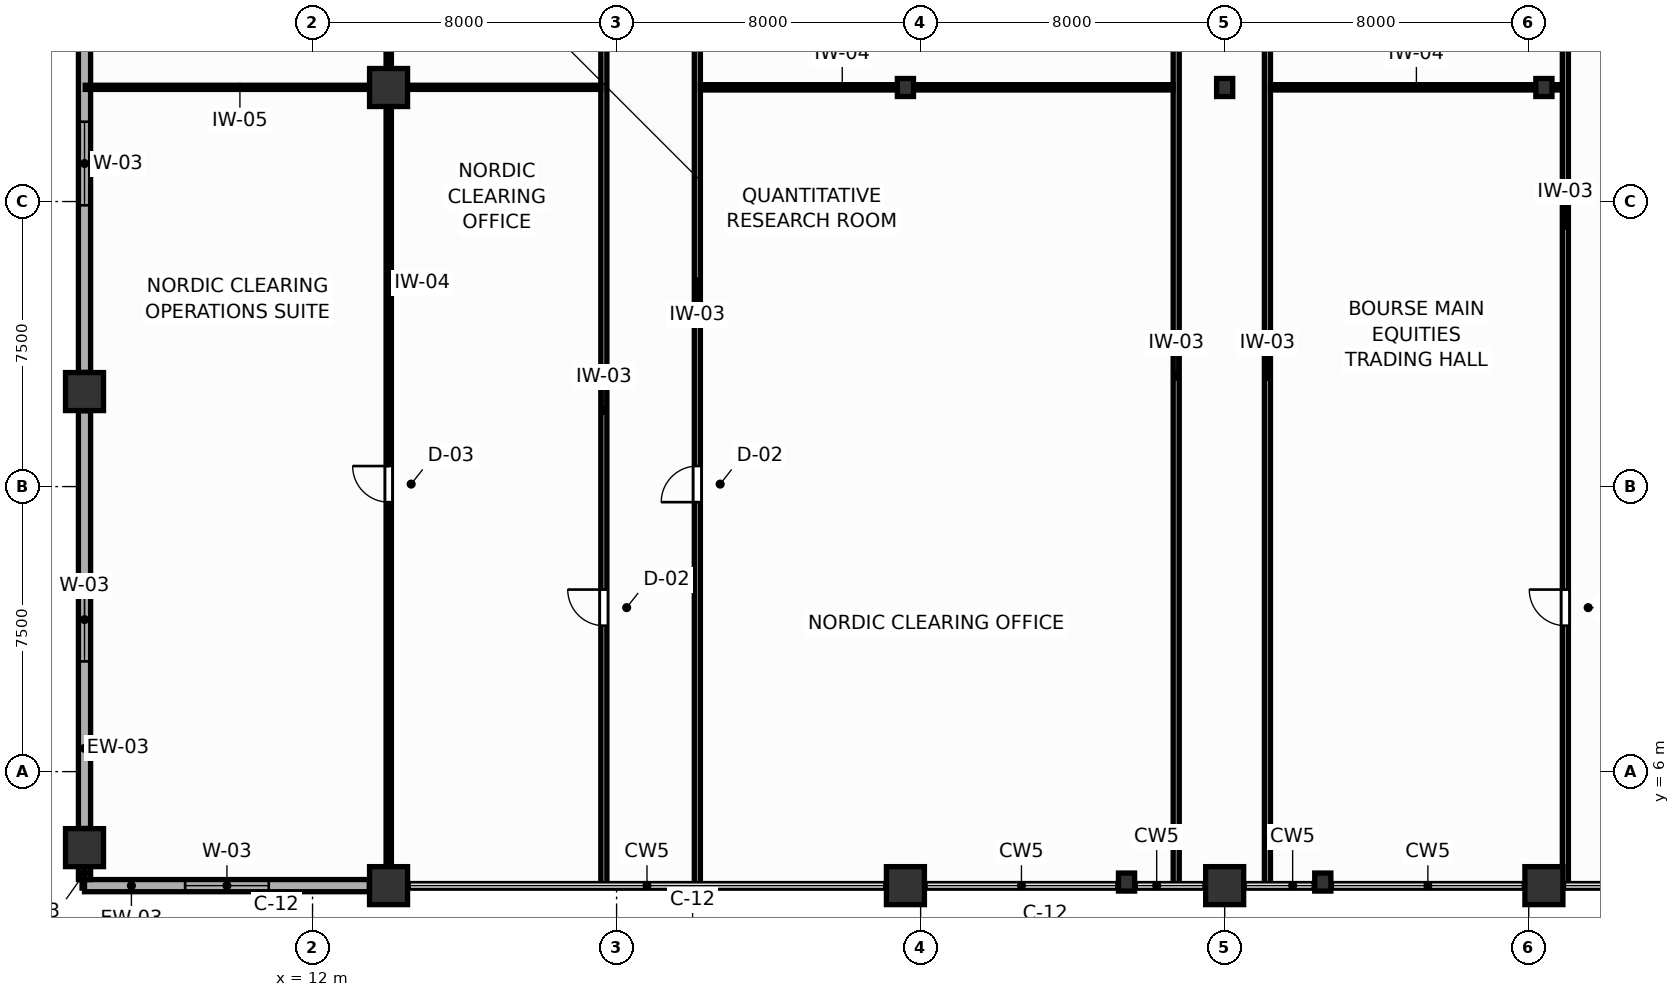
"""IFC4 building model, lengths in metres.
Left out: names, types, materials, properties, quantities, classifications, styles, units other than length and angle.
Written with IfcOpenShell. Run it as: python <this file> out.ifc"""

import sys

from ifc_helpers import new_model, si_unit, direction, frame, frame_2d, origin, origin_2d, place, context, subcontext, project, spatial, rectangle, i_section, extrude, source, transform, mapped, element, fill, save


model = new_model("IFC4")
c1 = context("Model", 3, precision=1e-05, world=origin(), true_north=direction((0.0, 1.0)))
c2 = subcontext(c1, "Body", "Model", "MODEL_VIEW")
j1 = project(units=[si_unit("LENGTHUNIT", "METRE"), si_unit("PLANEANGLEUNIT", "RADIAN")], contexts=[c1])
p1 = place(None, origin())
s1 = spatial("IfcSite", under=j1, at=p1, CompositionType="ELEMENT")
p2 = place(p1, origin())
s2 = spatial("IfcBuilding", under=s1, at=p2, CompositionType="ELEMENT")
p3 = place(p2, frame((0.0, 0.0, 4.8)))
s3 = spatial("IfcBuildingStorey", under=s2, at=p3, CompositionType="ELEMENT", Elevation=4.8)
m1 = source(origin(), c2, "Body", "SweptSolid", [
    extrude(i_section(OverallWidth=0.424, OverallDepth=0.474, WebThickness=0.045, FlangeThickness=0.072, FilletRadius=0.015, at=origin_2d()), origin(), (0.0, 0.0, 1.0), 4.8),
])
for number, where, z_axis, x_axis in (
    (1, (27.6, 24.0, 0.0), (0.0, 0.0, 1.0), (1.0, 0.0, 0.0)),
    (2, (44.4, 24.0, 0.0), (0.0, 0.0, 1.0), (1.0, 0.0, 0.0)),
    (3, (36.0, 24.0, 0.0), (0.0, 0.0, 1.0), (1.0, 0.0, 0.0)),
):
    element("IfcColumn", number, at=place(p3, frame(where, z_axis=z_axis, x_axis=x_axis)), inside=s3, PredefinedType="COLUMN", context=c2, shape_type="MappedRepresentation", body=[
        mapped(m1, transform((0.0, 0.0, 0.0), scale=1.0)),
    ])
m2 = source(origin(), c2, "Body", "SweptSolid", [
    extrude(rectangle(XDim=1.0, YDim=1.0, at=origin_2d()), origin(), (0.0, 0.0, 1.0), 4.8),
])
for number, where, z_axis, x_axis in (
    (4, (6.0, 4.0, 0.0), (0.0, 0.0, 1.0), (1.0, 0.0, 0.0)),
    (5, (6.0, 16.0, 0.0), (0.0, 0.0, 1.0), (1.0, 0.0, 0.0)),
    (6, (14.0, 3.0, 0.0), (0.0, 0.0, 1.0), (1.0, 0.0, 0.0)),
    (7, (27.6, 3.0, 0.0), (0.0, 0.0, 1.0), (1.0, 0.0, 0.0)),
    (8, (36.0, 3.0, 0.0), (0.0, 0.0, 1.0), (1.0, 0.0, 0.0)),
    (9, (44.4, 3.0, 0.0), (0.0, 0.0, 1.0), (1.0, 0.0, 0.0)),
    (10, (14.0, 24.0, 0.0), (0.0, 0.0, 1.0), (1.0, 0.0, 0.0)),
):
    element("IfcColumn", number, at=place(p3, frame(where, z_axis=z_axis, x_axis=x_axis)), inside=s3, PredefinedType="COLUMN", context=c2, shape_type="MappedRepresentation", body=[
        mapped(m2, transform((0.0, 0.0, 0.0), scale=1.0)),
    ])
for number, where, z_axis, x_axis in (
    (11, (33.418, 3.094, 0.0), (0.0, 0.0, 1.0), (1.0, 0.0, 0.0)),
    (12, (38.582, 3.094, 0.0), (0.0, 0.0, 1.0), (1.0, 0.0, 0.0)),
):
    element("IfcColumn", number, at=place(p3, frame(where, z_axis=z_axis, x_axis=x_axis)), inside=s3, PredefinedType="COLUMN", context=c2, shape_type="MappedRepresentation", body=[
        mapped(m1, transform((0.0, 0.0, 0.0), scale=1.0)),
    ])
p4 = place(p3, frame((6.0, 3.0, 0.0), z_axis=(0.0, 0.0, 1.0), x_axis=(1.0, 0.0, 0.0)))
e13 = element("IfcWall", 13, at=p4, inside=s3, PredefinedType="SOLIDWALL", context=c2, shape_type="SweptSolid", body=[
    extrude(rectangle(XDim=7.495, YDim=0.32, at=frame_2d((3.748, 0.0))), origin(), (0.0, 0.0, 1.0), 3.82),
])
p5 = place(p4, frame((2.647, 0.0, 0.75)))
e14 = element("IfcOpeningElement", 14, at=p5, cuts=e13, PredefinedType="OPENING", context=c2, shape_type="SweptSolid", body=[
    extrude(rectangle(XDim=2.2, YDim=2.0, at=frame_2d((1.1, 1.0))), frame((0.0, 0.17, 0.0), z_axis=(0.0, -1.0, 0.0), x_axis=(1.0, 0.0, 0.0)), (0.0, 0.0, 1.0), 0.34),
])
p6 = place(p3, frame((6.0, 3.16, 0.0), z_axis=(0.0, 0.0, 1.0), x_axis=(0.0, 1.0, 0.0)))
e15 = element("IfcWall", 15, at=p6, inside=s3, PredefinedType="SOLIDWALL", context=c2, shape_type="SweptSolid", body=[
    extrude(rectangle(XDim=0.335, YDim=0.32, at=frame_2d((0.167, 0.0))), origin(), (0.0, 0.0, 1.0), 4.52),
])
p7 = place(p3, frame((6.0, 4.505, 0.0), z_axis=(0.0, 0.0, 1.0), x_axis=(0.0, 1.0, 0.0)))
e16 = element("IfcWall", 16, at=p7, inside=s3, PredefinedType="SOLIDWALL", context=c2, shape_type="SweptSolid", body=[
    extrude(rectangle(XDim=10.99, YDim=0.32, at=frame_2d((5.495, 0.0))), origin(), (0.0, 0.0, 1.0), 3.82),
])
p8 = place(p7, frame((4.395, 0.0, 0.75)))
e17 = element("IfcOpeningElement", 17, at=p8, cuts=e16, PredefinedType="OPENING", context=c2, shape_type="SweptSolid", body=[
    extrude(rectangle(XDim=2.2, YDim=2.0, at=frame_2d((1.1, 1.0))), frame((0.0, 0.17, 0.0), z_axis=(0.0, -1.0, 0.0), x_axis=(1.0, 0.0, 0.0)), (0.0, 0.0, 1.0), 0.34),
])
p9 = place(p3, frame((6.0, 16.505, 0.0), z_axis=(0.0, 0.0, 1.0), x_axis=(0.0, 1.0, 0.0)))
e18 = element("IfcWall", 18, at=p9, inside=s3, PredefinedType="SOLIDWALL", context=c2, shape_type="SweptSolid", body=[
    extrude(rectangle(XDim=10.99, YDim=0.32, at=frame_2d((5.495, 0.0))), origin(), (0.0, 0.0, 1.0), 3.82),
])
p10 = place(p9, frame((4.395, 0.0, 0.75)))
e19 = element("IfcOpeningElement", 19, at=p10, cuts=e18, PredefinedType="OPENING", context=c2, shape_type="SweptSolid", body=[
    extrude(rectangle(XDim=2.2, YDim=2.0, at=frame_2d((1.1, 1.0))), frame((0.0, 0.17, 0.0), z_axis=(0.0, -1.0, 0.0), x_axis=(1.0, 0.0, 0.0)), (0.0, 0.0, 1.0), 0.34),
])
p11 = place(p3, frame((44.965, 3.02, 0.0), z_axis=(0.0, 0.0, 1.0), x_axis=(0.0, 1.0, 0.0)))
e20 = element("IfcWall", 20, at=p11, inside=s3, PredefinedType="PARTITIONING", context=c2, shape_type="SweptSolid", body=[
    extrude(rectangle(XDim=26.76, YDim=0.16, at=frame_2d((13.38, 0.0))), origin(), (0.0, 0.0, 1.0), 4.52),
])
p12 = place(p11, frame((6.82, 0.0, 0.0)))
e21 = element("IfcOpeningElement", 21, at=p12, cuts=e20, PredefinedType="OPENING", context=c2, shape_type="SweptSolid", body=[
    extrude(rectangle(XDim=0.95, YDim=2.05, at=frame_2d((0.475, 1.025))), frame((0.0, 0.09, 0.0), z_axis=(0.0, -1.0, 0.0), x_axis=(1.0, 0.0, 0.0)), (0.0, 0.0, 1.0), 0.18),
])
p13 = place(p3, frame((37.125, 3.02, 0.0), z_axis=(0.0, 0.0, 1.0), x_axis=(0.0, 1.0, 0.0)))
e22 = element("IfcWall", 22, at=p13, inside=s3, PredefinedType="PARTITIONING", context=c2, shape_type="SweptSolid", body=[
    extrude(rectangle(XDim=26.76, YDim=0.16, at=frame_2d((13.38, 0.0))), origin(), (0.0, 0.0, 1.0), 4.52),
])
p14 = place(p3, frame((22.125, 3.02, 0.0), z_axis=(0.0, 0.0, 1.0), x_axis=(0.0, 1.0, 0.0)))
e23 = element("IfcWall", 23, at=p14, inside=s3, PredefinedType="PARTITIONING", context=c2, shape_type="SweptSolid", body=[
    extrude(rectangle(XDim=26.76, YDim=0.16, at=frame_2d((13.38, 0.0))), origin(), (0.0, 0.0, 1.0), 4.52),
])
p15 = place(p14, frame((10.07, 0.0, 0.0)))
e24 = element("IfcOpeningElement", 24, at=p15, cuts=e23, PredefinedType="OPENING", context=c2, shape_type="SweptSolid", body=[
    extrude(rectangle(XDim=0.95, YDim=2.05, at=frame_2d((0.475, 1.025))), frame((0.0, 0.09, 0.0), z_axis=(0.0, -1.0, 0.0), x_axis=(1.0, 0.0, 0.0)), (0.0, 0.0, 1.0), 0.18),
])
p16 = place(p3, frame((34.725, 3.02, 0.0), z_axis=(0.0, 0.0, 1.0), x_axis=(0.0, 1.0, 0.0)))
e25 = element("IfcWall", 25, at=p16, inside=s3, PredefinedType="PARTITIONING", context=c2, shape_type="SweptSolid", body=[
    extrude(rectangle(XDim=26.76, YDim=0.16, at=frame_2d((13.38, 0.0))), origin(), (0.0, 0.0, 1.0), 4.52),
])
p17 = place(p3, frame((19.665, 3.02, 0.0), z_axis=(0.0, 0.0, 1.0), x_axis=(0.0, 1.0, 0.0)))
e26 = element("IfcWall", 26, at=p17, inside=s3, PredefinedType="PARTITIONING", context=c2, shape_type="SweptSolid", body=[
    extrude(rectangle(XDim=26.76, YDim=0.16, at=frame_2d((13.38, 0.0))), origin(), (0.0, 0.0, 1.0), 4.52),
])
p18 = place(p17, frame((6.82, 0.0, 0.0)))
e27 = element("IfcOpeningElement", 27, at=p18, cuts=e26, PredefinedType="OPENING", context=c2, shape_type="SweptSolid", body=[
    extrude(rectangle(XDim=0.95, YDim=2.05, at=frame_2d((0.475, 1.025))), frame((0.0, 0.09, 0.0), z_axis=(0.0, -1.0, 0.0), x_axis=(1.0, 0.0, 0.0)), (0.0, 0.0, 1.0), 0.18),
])
p19 = place(p17, frame((23.238, 0.0, 0.0)))
e28 = element("IfcOpeningElement", 28, at=p19, cuts=e26, PredefinedType="OPENING", context=c2, shape_type="SweptSolid", body=[
    extrude(rectangle(XDim=0.95, YDim=2.05, at=frame_2d((0.475, 1.025))), frame((0.0, 0.09, 0.0), z_axis=(0.0, -1.0, 0.0), x_axis=(1.0, 0.0, 0.0)), (0.0, 0.0, 1.0), 0.18),
])
p20 = place(p3, frame((14.005, 3.02, 0.0), z_axis=(0.0, 0.0, 1.0), x_axis=(0.0, 1.0, 0.0)))
e29 = element("IfcWall", 29, at=p20, inside=s3, PredefinedType="PARTITIONING", context=c2, shape_type="SweptSolid", body=[
    extrude(rectangle(XDim=26.673, YDim=0.14, at=frame_2d((13.336, 0.0))), origin(), (0.0, 0.0, 1.0), 3.82),
])
p21 = place(p20, frame((10.07, 0.0, 0.0)))
e30 = element("IfcOpeningElement", 30, at=p21, cuts=e29, PredefinedType="OPENING", context=c2, shape_type="SweptSolid", body=[
    extrude(rectangle(XDim=0.95, YDim=2.05, at=frame_2d((0.475, 1.025))), frame((0.0, 0.08, 0.0), z_axis=(0.0, -1.0, 0.0), x_axis=(1.0, 0.0, 0.0)), (0.0, 0.0, 1.0), 0.16),
])
p22 = place(p3, frame((6.02, 24.005, 0.0), z_axis=(0.0, 0.0, 1.0), x_axis=(1.0, 0.0, 0.0)))
e31 = element("IfcWall", 31, at=p22, inside=s3, PredefinedType="MOVABLE", context=c2, shape_type="SweptSolid", body=[
    extrude(rectangle(XDim=13.563, YDim=0.11, at=frame_2d((6.781, 0.0))), origin(), (0.0, 0.0, 1.0), 3.92),
])
p23 = place(p3, frame((22.207, 24.005, 0.0), z_axis=(0.0, 0.0, 1.0), x_axis=(1.0, 0.0, 0.0)))
e32 = element("IfcWall", 32, at=p23, inside=s3, PredefinedType="PARTITIONING", context=c2, shape_type="SweptSolid", body=[
    extrude(rectangle(XDim=12.436, YDim=0.14, at=frame_2d((6.218, 0.0))), origin(), (0.0, 0.0, 1.0), 3.92),
])
p24 = place(p3, frame((37.207, 24.005, 0.0), z_axis=(0.0, 0.0, 1.0), x_axis=(1.0, 0.0, 0.0)))
e33 = element("IfcWall", 33, at=p24, inside=s3, PredefinedType="PARTITIONING", context=c2, shape_type="SweptSolid", body=[
    extrude(rectangle(XDim=7.676, YDim=0.14, at=frame_2d((3.838, 0.0))), origin(), (0.0, 0.0, 1.0), 3.92),
])
p25 = place(p5, origin())
e34 = element("IfcWindow", 34, at=p25, inside=s3, PartitioningType="SINGLE_PANEL", PredefinedType="WINDOW", context=c2, shape_type="SweptSolid", body=[
    extrude(rectangle(XDim=2.2, YDim=2.0, at=frame_2d((1.1, 1.0))), frame((0.0, 0.03, 0.0), z_axis=(0.0, -1.0, 0.0), x_axis=(1.0, 0.0, 0.0)), (0.0, 0.0, 1.0), 0.06),
])
fill(e14, e34)
p26 = place(p8, origin())
e35 = element("IfcWindow", 35, at=p26, inside=s3, PartitioningType="SINGLE_PANEL", PredefinedType="WINDOW", context=c2, shape_type="SweptSolid", body=[
    extrude(rectangle(XDim=2.2, YDim=2.0, at=frame_2d((1.1, 1.0))), frame((0.0, 0.03, 0.0), z_axis=(0.0, -1.0, 0.0), x_axis=(1.0, 0.0, 0.0)), (0.0, 0.0, 1.0), 0.06),
])
fill(e17, e35)
p27 = place(p10, origin())
e36 = element("IfcWindow", 36, at=p27, inside=s3, PartitioningType="SINGLE_PANEL", PredefinedType="WINDOW", context=c2, shape_type="SweptSolid", body=[
    extrude(rectangle(XDim=2.2, YDim=2.0, at=frame_2d((1.1, 1.0))), frame((0.0, 0.03, 0.0), z_axis=(0.0, -1.0, 0.0), x_axis=(1.0, 0.0, 0.0)), (0.0, 0.0, 1.0), 0.06),
])
fill(e19, e36)
p28 = place(p12, origin())
e37 = element("IfcDoor", 37, at=p28, inside=s3, OperationType="SINGLE_SWING_RIGHT", PredefinedType="DOOR", context=c2, shape_type="SweptSolid", body=[
    extrude(rectangle(XDim=0.95, YDim=2.05, at=frame_2d((0.475, 1.025))), frame((0.0, 0.025, 0.0), z_axis=(0.0, -1.0, 0.0), x_axis=(1.0, 0.0, 0.0)), (0.0, 0.0, 1.0), 0.05),
])
fill(e21, e37)
p29 = place(p15, origin())
e38 = element("IfcDoor", 38, at=p29, inside=s3, OperationType="SINGLE_SWING_LEFT", PredefinedType="DOOR", context=c2, shape_type="SweptSolid", body=[
    extrude(rectangle(XDim=0.95, YDim=2.05, at=frame_2d((0.475, 1.025))), frame((0.0, 0.025, 0.0), z_axis=(0.0, -1.0, 0.0), x_axis=(1.0, 0.0, 0.0)), (0.0, 0.0, 1.0), 0.05),
])
fill(e24, e38)
p30 = place(p18, origin())
e39 = element("IfcDoor", 39, at=p30, inside=s3, OperationType="SINGLE_SWING_RIGHT", PredefinedType="DOOR", context=c2, shape_type="SweptSolid", body=[
    extrude(rectangle(XDim=0.95, YDim=2.05, at=frame_2d((0.475, 1.025))), frame((0.0, 0.025, 0.0), z_axis=(0.0, -1.0, 0.0), x_axis=(1.0, 0.0, 0.0)), (0.0, 0.0, 1.0), 0.05),
])
fill(e27, e39)
p31 = place(p21, origin())
e40 = element("IfcDoor", 40, at=p31, inside=s3, OperationType="SINGLE_SWING_RIGHT", PredefinedType="DOOR", context=c2, shape_type="SweptSolid", body=[
    extrude(rectangle(XDim=0.95, YDim=2.05, at=frame_2d((0.475, 1.025))), frame((0.0, 0.025, 0.0), z_axis=(0.0, -1.0, 0.0), x_axis=(1.0, 0.0, 0.0)), (0.0, 0.0, 1.0), 0.05),
])
fill(e30, e40)
save(model, sys.argv[1])
